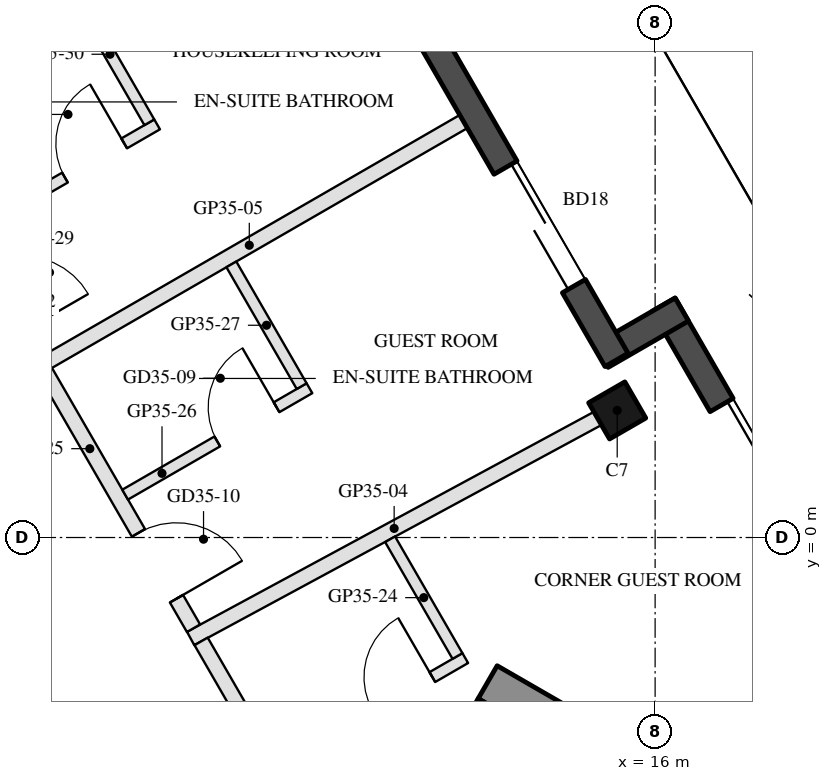
"""IFC4 building model, lengths in metres.
Left out: names, types, materials, properties, quantities, classifications, styles, units other than length and angle.
Written with IfcOpenShell. Run it as: python <this file> out.ifc"""

import sys

from ifc_helpers import new_model, si_unit, direction, frame, frame_2d, origin, origin_2d, place, context, subcontext, project, spatial, rectangle, hollow_rectangle, extrude, boolean, halfspace, element, fill, save


model = new_model("IFC4")
c1 = context("Model", 3, precision=1e-05, world=origin(), true_north=direction((0.0, 1.0)))
c2 = subcontext(c1, "Body", "Model", "MODEL_VIEW")
j1 = project(units=[si_unit("LENGTHUNIT", "METRE"), si_unit("PLANEANGLEUNIT", "RADIAN")], contexts=[c1])
p1 = place(None, origin())
s1 = spatial("IfcSite", under=j1, at=p1, CompositionType="ELEMENT")
p2 = place(p1, origin())
s2 = spatial("IfcBuilding", under=s1, at=p2, CompositionType="ELEMENT")
p3 = place(p2, frame((0.0, 0.0, 324.4)))
s3 = spatial("IfcBuildingStorey", under=s2, at=p3, CompositionType="ELEMENT", Elevation=324.4)
p4 = place(p3, frame((15.501, 1.672, 0.0), z_axis=(0.0, 0.0, 1.0), x_axis=(-0.5, 0.866025403784, 0.0)))
e1 = element("IfcColumn", 1, at=p4, inside=s3, PredefinedType="COLUMN", context=c2, shape_type="SweptSolid", body=[
    boolean("DIFFERENCE", boolean("DIFFERENCE", extrude(hollow_rectangle(XDim=0.55, YDim=0.55, WallThickness=0.025, at=origin_2d()), origin(), (0.0, 0.0, 1.0), 3.7), halfspace(frame((0.0, 0.0, 0.034), z_axis=(0.0, 0.0, 1.0), x_axis=(1.0, 0.0, 0.0)), True)), halfspace(frame((0.0, 0.0, 3.666), z_axis=(0.0, 0.0, 1.0), x_axis=(1.0, 0.0, 0.0)), False)),
])
p5 = place(p3, frame((20.916, -5.257, 0.0), z_axis=(0.0, 0.0, 1.0), x_axis=(-0.500022310942, 0.866012522173, 0.0)))
e2 = element("IfcWall", 2, at=p5, inside=s3, PredefinedType="SOLIDWALL", context=c2, shape_type="SweptSolid", body=[
    extrude(rectangle(XDim=9.608, YDim=0.35, at=frame_2d((4.804, 0.0))), origin(), (0.0, 0.0, 1.0), 3.55),
])
p6 = place(p5, frame((0.381, 0.0, 0.3)))
e3 = element("IfcOpeningElement", 3, at=p6, cuts=e2, PredefinedType="OPENING", context=c2, shape_type="SweptSolid", body=[
    extrude(rectangle(XDim=1.4, YDim=2.65, at=frame_2d((0.7, 1.325))), frame((0.0, 0.185, 0.0), z_axis=(0.0, -1.0, 0.0), x_axis=(1.0, 0.0, 0.0)), (0.0, 0.0, 1.0), 0.37),
])
p7 = place(p5, frame((5.683, 0.0, 0.0)))
e4 = element("IfcOpeningElement", 4, at=p7, cuts=e2, PredefinedType="OPENING", context=c2, shape_type="SweptSolid", body=[
    extrude(rectangle(XDim=2.4, YDim=2.4, at=frame_2d((1.2, 1.2))), frame((0.0, 0.185, 0.0), z_axis=(0.0, -1.0, 0.0), x_axis=(1.0, 0.0, 0.0)), (0.0, 0.0, 1.0), 0.37),
])
p8 = place(p5, frame((3.031, 0.0, 0.3)))
e5 = element("IfcOpeningElement", 5, at=p8, cuts=e2, PredefinedType="OPENING", context=c2, shape_type="SweptSolid", body=[
    extrude(rectangle(XDim=2.3, YDim=2.65, at=frame_2d((1.15, 1.325))), frame((0.0, 0.185, 0.0), z_axis=(0.0, -1.0, 0.0), x_axis=(1.0, 0.0, 0.0)), (0.0, 0.0, 1.0), 0.37),
])
p9 = place(p3, frame((16.351, 3.0, 0.0), z_axis=(0.0, 0.0, 1.0), x_axis=(-0.866005645448, -0.500034220881, 0.0)))
e6 = element("IfcWall", 6, at=p9, inside=s3, PredefinedType="SOLIDWALL", context=c2, shape_type="SweptSolid", body=[
    extrude(rectangle(XDim=1.22, YDim=0.35, at=frame_2d((0.61, 0.0))), origin(), (0.0, 0.0, 1.0), 3.55),
])
p10 = place(p3, frame((15.492, 2.337, 0.0), z_axis=(0.0, 0.0, 1.0), x_axis=(-0.499999159329, 0.866025889145, 0.0)))
e7 = element("IfcWall", 7, at=p10, inside=s3, PredefinedType="SOLIDWALL", context=c2, shape_type="SweptSolid", body=[
    extrude(rectangle(XDim=5.143, YDim=0.35, at=frame_2d((2.571, 0.0))), origin(), (0.0, 0.0, 1.0), 3.55),
])
p11 = place(p10, frame((1.122, 0.0, 0.0)))
e8 = element("IfcOpeningElement", 8, at=p11, cuts=e7, PredefinedType="OPENING", context=c2, shape_type="SweptSolid", body=[
    extrude(rectangle(XDim=1.8, YDim=2.4, at=frame_2d((0.9, 1.2))), frame((0.0, 0.185, 0.0), z_axis=(0.0, -1.0, 0.0), x_axis=(1.0, 0.0, 0.0)), (0.0, 0.0, 1.0), 0.37),
])
p12 = place(p3, frame((13.797, -1.903, 0.0), z_axis=(0.0, 0.0, 1.0), x_axis=(0.866030186143, -0.49999171662, 0.0)))
e9 = element("IfcWall", 9, at=p12, inside=s3, PredefinedType="SHEAR", context=c2, shape_type="SweptSolid", body=[
    extrude(rectangle(XDim=8.267, YDim=0.5, at=frame_2d((4.134, 0.0))), origin(), (0.0, 0.0, 1.0), 3.5),
])
p13 = place(p3, frame((8.845, -10.88, 0.0), z_axis=(0.0, 0.0, 1.0), x_axis=(0.500004234368, 0.866022959057, 0.0)))
e10 = element("IfcWall", 10, at=p13, inside=s3, PredefinedType="SHEAR", context=c2, shape_type="SweptSolid", body=[
    extrude(rectangle(XDim=10.0, YDim=0.4, at=frame_2d((5.0, 0.0))), origin(), (0.0, 0.0, 1.0), 3.5),
])
p14 = place(p13, frame((3.55, 0.0, 0.0)))
e11 = element("IfcOpeningElement", 11, at=p14, cuts=e10, PredefinedType="OPENING", context=c2, shape_type="SweptSolid", body=[
    extrude(rectangle(XDim=1.1, YDim=2.1, at=frame_2d((0.55, 1.05))), frame((0.0, 0.21, 0.0), z_axis=(0.0, -1.0, 0.0), x_axis=(1.0, 0.0, 0.0)), (0.0, 0.0, 1.0), 0.42),
])
p15 = place(p13, frame((5.85, 0.0, 0.0)))
e12 = element("IfcOpeningElement", 12, at=p15, cuts=e10, PredefinedType="OPENING", context=c2, shape_type="SweptSolid", body=[
    extrude(rectangle(XDim=1.4, YDim=2.1, at=frame_2d((0.7, 1.05))), frame((0.0, 0.21, 0.0), z_axis=(0.0, -1.0, 0.0), x_axis=(1.0, 0.0, 0.0)), (0.0, 0.0, 1.0), 0.42),
])
p16 = place(p3, frame((15.244, 1.567, 0.0), z_axis=(0.0, 0.0, 1.0), x_axis=(-0.879711500968, -0.475507807575, 0.0)))
e13 = element("IfcWall", 13, at=p16, inside=s3, PredefinedType="PARTITIONING", context=c2, shape_type="SweptSolid", body=[
    extrude(rectangle(XDim=6.088, YDim=0.2, at=frame_2d((3.044, 0.0))), origin(), (0.0, 0.0, 1.0), 3.15),
])
p17 = place(p3, frame((13.48, 5.473, 0.0), z_axis=(0.0, 0.0, 1.0), x_axis=(-0.866030715483, -0.499990799755, 0.0)))
e14 = element("IfcWall", 14, at=p17, inside=s3, PredefinedType="PARTITIONING", context=c2, shape_type="SweptSolid", body=[
    extrude(rectangle(XDim=6.51, YDim=0.2, at=frame_2d((3.255, 0.0))), origin(), (0.0, 0.0, 1.0), 3.1),
])
p18 = place(p3, frame((11.959, 9.907, 0.0), z_axis=(0.0, 0.0, 1.0), x_axis=(-0.821566459399, -0.570112754454, 0.0)))
e15 = element("IfcWall", 15, at=p18, inside=s3, PredefinedType="PARTITIONING", context=c2, shape_type="SweptSolid", body=[
    extrude(rectangle(XDim=7.436, YDim=0.2, at=frame_2d((3.718, 0.0))), origin(), (0.0, 0.0, 1.0), 3.1),
])
p19 = place(p3, frame((10.027, -1.367, 0.0), z_axis=(0.0, 0.0, 1.0), x_axis=(0.499973559465, -0.866040668696, 0.0)))
e16 = element("IfcWall", 16, at=p19, inside=s3, PredefinedType="PARTITIONING", context=c2, shape_type="SweptSolid", body=[
    extrude(rectangle(XDim=1.739, YDim=0.2, at=frame_2d((0.87, 0.0))), origin(), (0.0, 0.0, 1.0), 3.15),
])
p20 = place(p3, frame((11.077, -2.987, 0.0), z_axis=(0.0, 0.0, 1.0), x_axis=(0.865996816683, 0.500049511043, 0.0)))
e17 = element("IfcWall", 17, at=p20, inside=s3, PredefinedType="PARTITIONING", context=c2, shape_type="SweptSolid", body=[
    extrude(rectangle(XDim=2.8, YDim=0.15, at=frame_2d((1.4, 0.0))), origin(), (0.0, 0.0, 1.0), 3.55),
])
p21 = place(p20, frame((1.4, 0.0, 0.0)))
e18 = element("IfcOpeningElement", 18, at=p21, cuts=e17, PredefinedType="OPENING", context=c2, shape_type="SweptSolid", body=[
    extrude(rectangle(XDim=0.9, YDim=2.1, at=frame_2d((0.45, 1.05))), frame((0.0, 0.085, 0.0), z_axis=(0.0, -1.0, 0.0), x_axis=(1.0, 0.0, 0.0)), (0.0, 0.0, 1.0), 0.17),
])
p22 = place(p3, frame((13.4, -1.559, 0.0), z_axis=(0.0, 0.0, 1.0), x_axis=(-0.499988586725, 0.866031993141, 0.0)))
e19 = element("IfcWall", 19, at=p22, inside=s3, PredefinedType="PARTITIONING", context=c2, shape_type="SweptSolid", body=[
    extrude(rectangle(XDim=1.773, YDim=0.15, at=frame_2d((0.887, 0.0))), origin(), (0.0, 0.0, 1.0), 3.15),
])
p23 = place(p3, frame((7.978, 2.181, 0.0), z_axis=(0.0, 0.0, 1.0), x_axis=(0.499986368499, -0.866033273792, 0.0)))
e20 = element("IfcWall", 20, at=p23, inside=s3, PredefinedType="PARTITIONING", context=c2, shape_type="SweptSolid", body=[
    extrude(rectangle(XDim=3.897, YDim=0.2, at=frame_2d((1.948, 0.0))), origin(), (0.0, 0.0, 1.0), 3.15),
])
p24 = place(p23, frame((2.448, 0.0, 0.0)))
e21 = element("IfcOpeningElement", 21, at=p24, cuts=e20, PredefinedType="OPENING", context=c2, shape_type="SweptSolid", body=[
    extrude(rectangle(XDim=1.0, YDim=2.1, at=frame_2d((0.5, 1.05))), frame((0.0, 0.11, 0.0), z_axis=(0.0, -1.0, 0.0), x_axis=(1.0, 0.0, 0.0)), (0.0, 0.0, 1.0), 0.22),
])
p25 = place(p3, frame((9.027, 0.564, 0.0), z_axis=(0.0, 0.0, 1.0), x_axis=(0.866034573852, 0.49998411664, 0.0)))
e22 = element("IfcWall", 22, at=p25, inside=s3, PredefinedType="PARTITIONING", context=c2, shape_type="SweptSolid", body=[
    extrude(rectangle(XDim=2.8, YDim=0.15, at=frame_2d((1.4, 0.0))), origin(), (0.0, 0.0, 1.0), 3.55),
])
p26 = place(p25, frame((1.4, 0.0, 0.0)))
e23 = element("IfcOpeningElement", 23, at=p26, cuts=e22, PredefinedType="OPENING", context=c2, shape_type="SweptSolid", body=[
    extrude(rectangle(XDim=0.9, YDim=2.1, at=frame_2d((0.45, 1.05))), frame((0.0, 0.085, 0.0), z_axis=(0.0, -1.0, 0.0), x_axis=(1.0, 0.0, 0.0)), (0.0, 0.0, 1.0), 0.17),
])
p27 = place(p3, frame((11.35, 1.992, 0.0), z_axis=(0.0, 0.0, 1.0), x_axis=(-0.49994333299, 0.866058118026, 0.0)))
e24 = element("IfcWall", 24, at=p27, inside=s3, PredefinedType="PARTITIONING", context=c2, shape_type="SweptSolid", body=[
    extrude(rectangle(XDim=1.85, YDim=0.15, at=frame_2d((0.925, 0.0))), origin(), (0.0, 0.0, 1.0), 3.15),
])
p28 = place(p3, frame((7.023, 4.036, 0.0), z_axis=(0.0, 0.0, 1.0), x_axis=(0.866034573852, 0.49998411664, 0.0)))
e25 = element("IfcWall", 25, at=p28, inside=s3, PredefinedType="PARTITIONING", context=c2, shape_type="SweptSolid", body=[
    extrude(rectangle(XDim=2.8, YDim=0.15, at=frame_2d((1.4, 0.0))), origin(), (0.0, 0.0, 1.0), 3.15),
])
p29 = place(p28, frame((1.4, 0.0, 0.0)))
e26 = element("IfcOpeningElement", 26, at=p29, cuts=e25, PredefinedType="OPENING", context=c2, shape_type="SweptSolid", body=[
    extrude(rectangle(XDim=0.9, YDim=2.1, at=frame_2d((0.45, 1.05))), frame((0.0, 0.085, 0.0), z_axis=(0.0, -1.0, 0.0), x_axis=(1.0, 0.0, 0.0)), (0.0, 0.0, 1.0), 0.17),
])
p30 = place(p3, frame((9.346, 5.463, 0.0), z_axis=(0.0, 0.0, 1.0), x_axis=(-0.500049439734, 0.865996857859, 0.0)))
e27 = element("IfcWall", 27, at=p30, inside=s3, PredefinedType="PARTITIONING", context=c2, shape_type="SweptSolid", body=[
    extrude(rectangle(XDim=2.068, YDim=0.15, at=frame_2d((1.034, 0.0))), origin(), (0.0, 0.0, 1.0), 3.15),
])
p31 = place(p7, frame((2.4, 0.0, 0.0), z_axis=(0.0, 0.0, 1.0), x_axis=(-1.0, 0.0, 0.0)))
e28 = element("IfcDoor", 28, at=p31, inside=s3, OperationType="SLIDING_TO_LEFT", PredefinedType="DOOR", context=c2, shape_type="SweptSolid", body=[
    extrude(rectangle(XDim=2.4, YDim=2.4, at=frame_2d((1.2, 1.2))), frame((0.0, 0.025, 0.0), z_axis=(0.0, -1.0, 0.0), x_axis=(1.0, 0.0, 0.0)), (0.0, 0.0, 1.0), 0.05),
])
fill(e4, e28)
p32 = place(p11, frame((1.8, 0.0, 0.0), z_axis=(0.0, 0.0, 1.0), x_axis=(-1.0, 0.0, 0.0)))
e29 = element("IfcDoor", 29, at=p32, inside=s3, OperationType="SLIDING_TO_LEFT", PredefinedType="DOOR", context=c2, shape_type="SweptSolid", body=[
    extrude(rectangle(XDim=1.8, YDim=2.4, at=frame_2d((0.9, 1.2))), frame((0.0, 0.025, 0.0), z_axis=(0.0, -1.0, 0.0), x_axis=(1.0, 0.0, 0.0)), (0.0, 0.0, 1.0), 0.05),
])
fill(e8, e29)
p33 = place(p21, origin())
e30 = element("IfcDoor", 30, at=p33, inside=s3, OperationType="SINGLE_SWING_RIGHT", PredefinedType="DOOR", context=c2, shape_type="SweptSolid", body=[
    extrude(rectangle(XDim=0.9, YDim=2.1, at=frame_2d((0.45, 1.05))), frame((0.0, 0.025, 0.0), z_axis=(0.0, -1.0, 0.0), x_axis=(1.0, 0.0, 0.0)), (0.0, 0.0, 1.0), 0.05),
])
fill(e18, e30)
p34 = place(p26, origin())
e31 = element("IfcDoor", 31, at=p34, inside=s3, OperationType="SINGLE_SWING_RIGHT", PredefinedType="DOOR", context=c2, shape_type="SweptSolid", body=[
    extrude(rectangle(XDim=0.9, YDim=2.1, at=frame_2d((0.45, 1.05))), frame((0.0, 0.025, 0.0), z_axis=(0.0, -1.0, 0.0), x_axis=(1.0, 0.0, 0.0)), (0.0, 0.0, 1.0), 0.05),
])
fill(e23, e31)
p35 = place(p24, origin())
e32 = element("IfcDoor", 32, at=p35, inside=s3, OperationType="SINGLE_SWING_RIGHT", PredefinedType="DOOR", context=c2, shape_type="SweptSolid", body=[
    extrude(rectangle(XDim=1.0, YDim=2.1, at=frame_2d((0.5, 1.05))), frame((0.0, 0.025, 0.0), z_axis=(0.0, -1.0, 0.0), x_axis=(1.0, 0.0, 0.0)), (0.0, 0.0, 1.0), 0.05),
])
fill(e21, e32)
p36 = place(p29, origin())
e33 = element("IfcDoor", 33, at=p36, inside=s3, OperationType="SINGLE_SWING_RIGHT", PredefinedType="DOOR", context=c2, shape_type="SweptSolid", body=[
    extrude(rectangle(XDim=0.9, YDim=2.1, at=frame_2d((0.45, 1.05))), frame((0.0, 0.025, 0.0), z_axis=(0.0, -1.0, 0.0), x_axis=(1.0, 0.0, 0.0)), (0.0, 0.0, 1.0), 0.05),
])
fill(e26, e33)
save(model, sys.argv[1])
